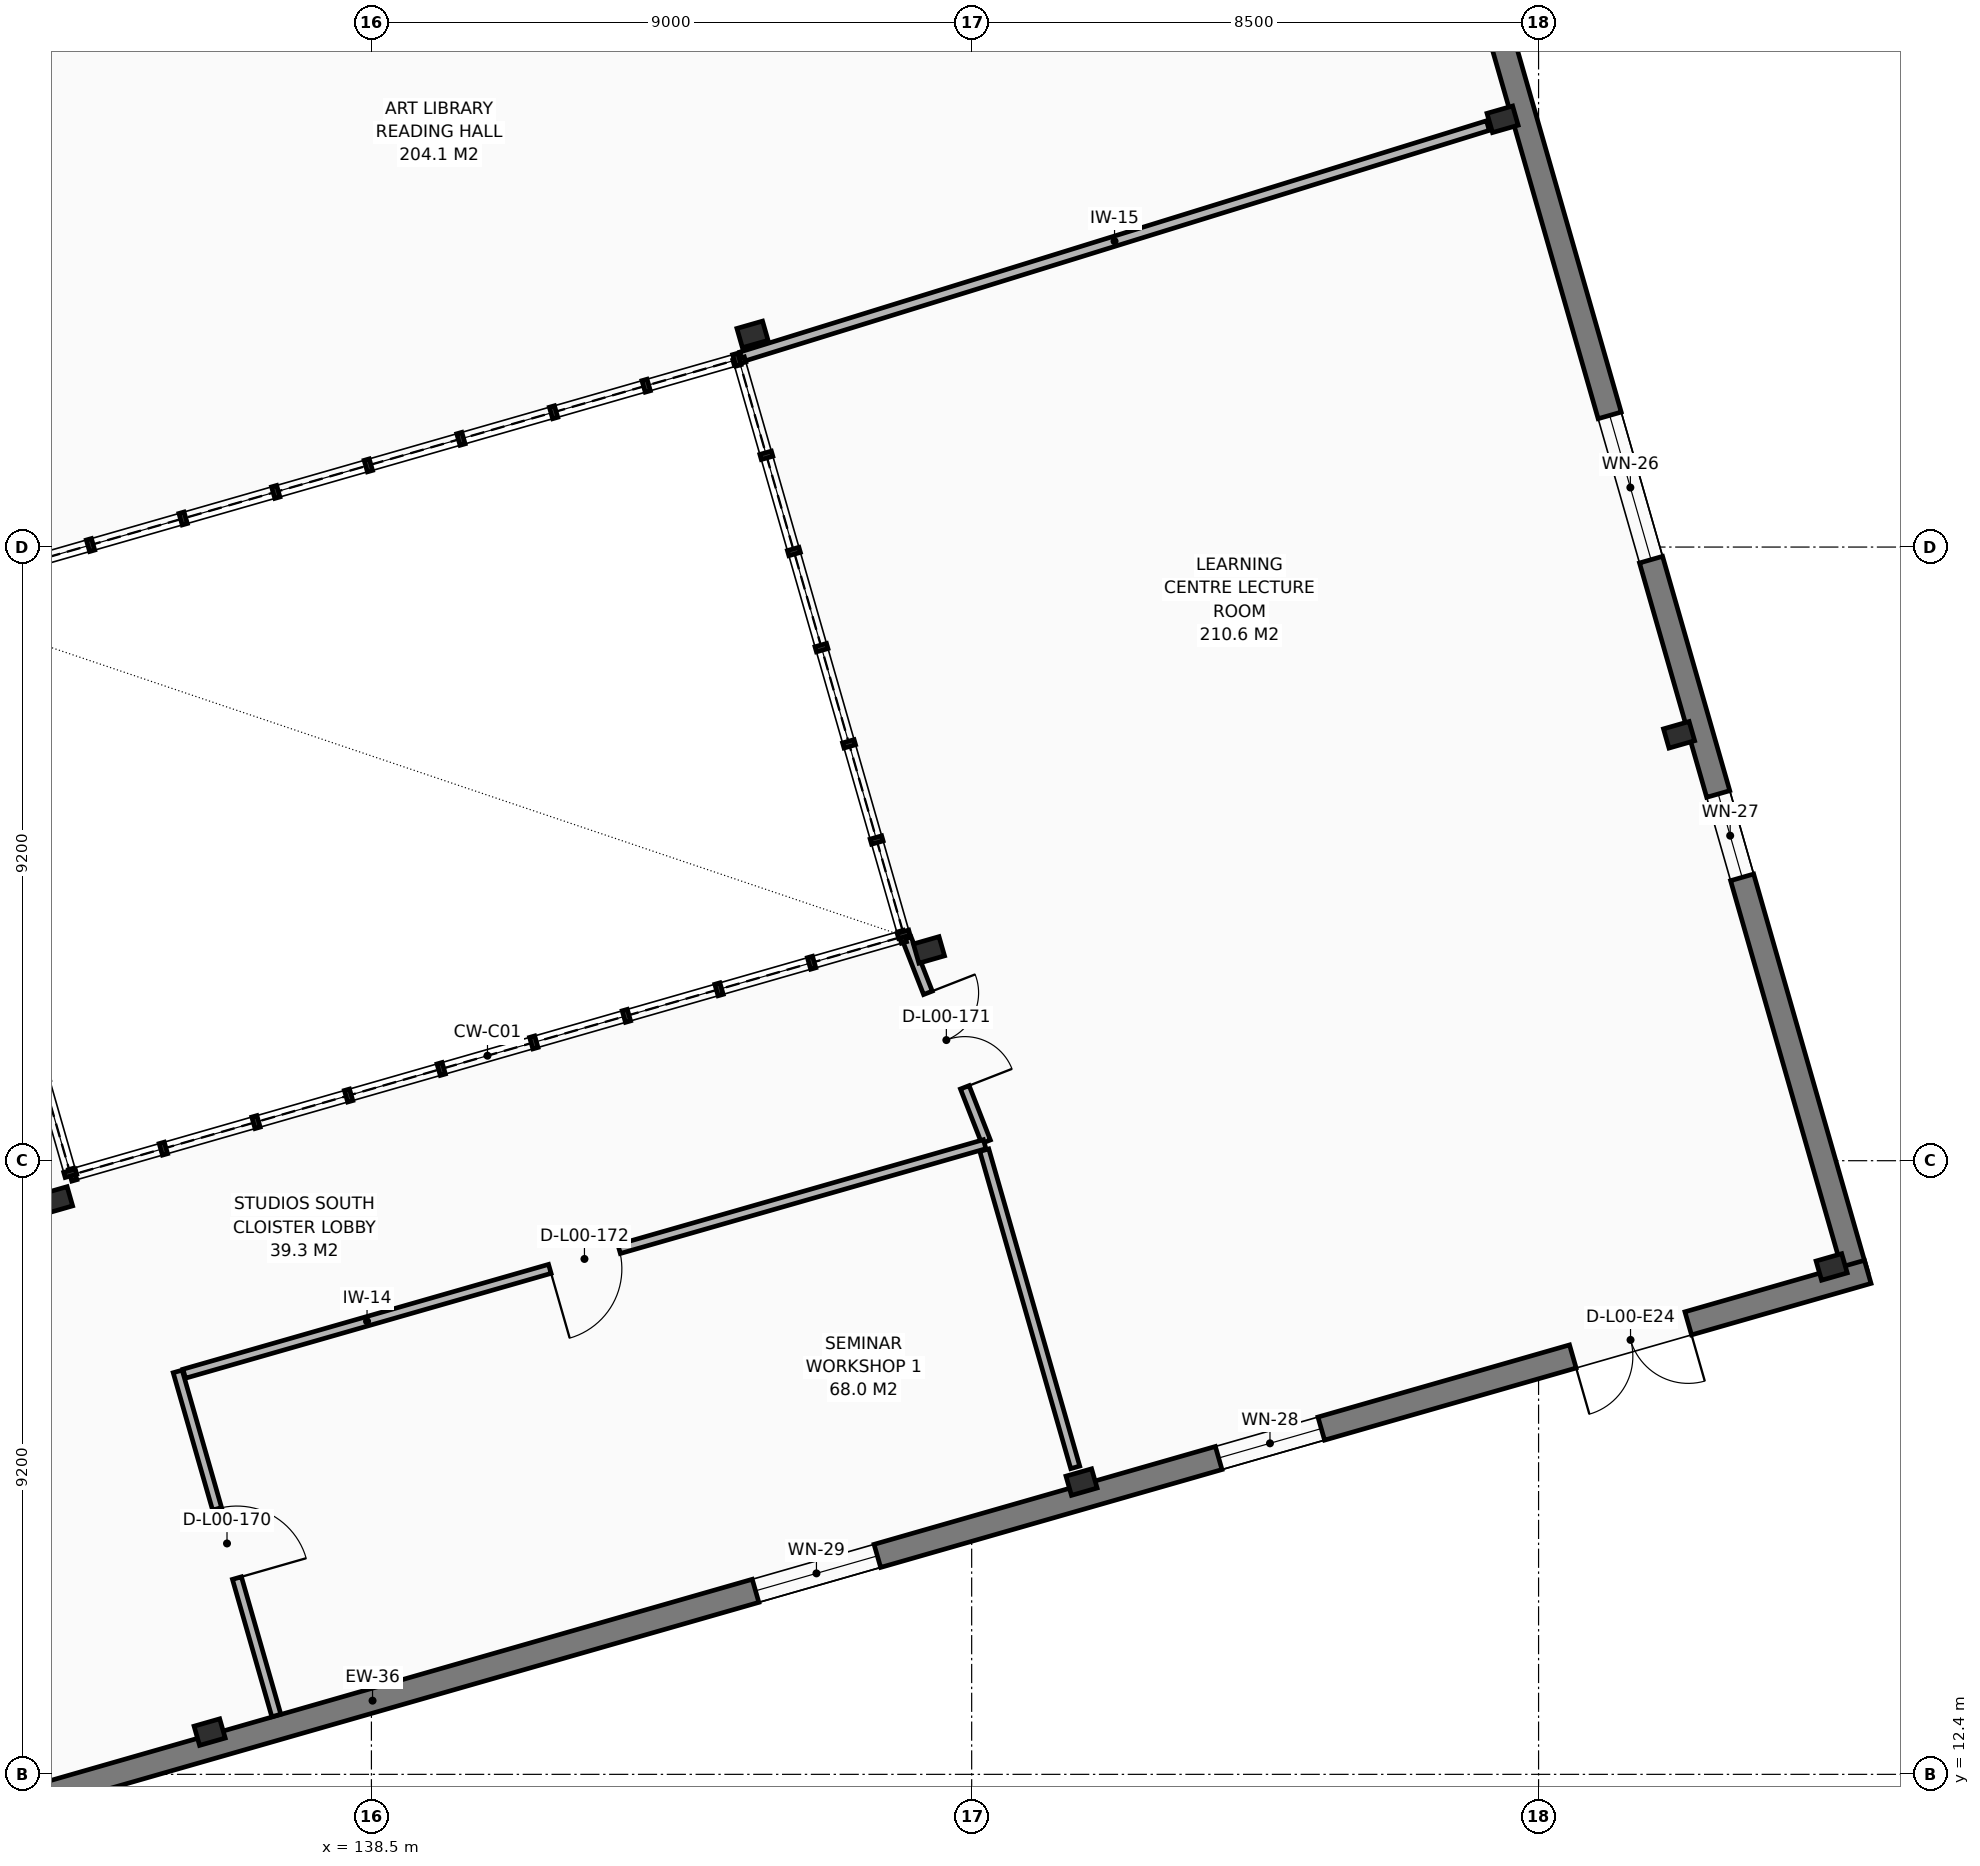
"""IFC4 building model, lengths in metres.
Left out: names, types, materials, properties, quantities, classifications, styles, units other than length and angle.
Written with IfcOpenShell. Run it as: python <this file> out.ifc"""

import sys

from ifc_helpers import new_model, si_unit, direction, frame, frame_2d, origin, origin_2d, place, context, subcontext, project, spatial, rectangle, i_section, extrude, element, fill, save


model = new_model("IFC4")
c1 = context("Model", 3, precision=1e-05, world=origin(), true_north=direction((0.0, 1.0)))
c2 = subcontext(c1, "Body", "Model", "MODEL_VIEW")
j1 = project(units=[si_unit("LENGTHUNIT", "METRE"), si_unit("PLANEANGLEUNIT", "RADIAN")], contexts=[c1])
p1 = place(None, origin())
s1 = spatial("IfcSite", under=j1, at=p1, CompositionType="ELEMENT")
p2 = place(p1, origin())
s2 = spatial("IfcBuilding", under=s1, at=p2, CompositionType="ELEMENT")
p3 = place(p2, origin())
s3 = spatial("IfcBuildingStorey", under=s2, at=p3, CompositionType="ELEMENT", Elevation=0.0)
for number, where, z_axis, x_axis in (
    (1, (136.074, 13.033, 0.0), (0.0, 0.0, 1.0), (0.961, 0.276, 0.0)),
    (2, (133.787, 21.012, 0.0), (0.0, 0.0, 1.0), (0.961, 0.276, 0.0)),
    (3, (149.147, 16.782, 0.0), (0.0, 0.0, 1.0), (0.961, 0.276, 0.0)),
    (4, (146.86, 24.76, 0.0), (0.0, 0.0, 1.0), (0.961, 0.276, 0.0)),
    (5, (144.213, 33.988, 0.0), (0.0, 0.0, 1.0), (0.961, 0.276, 0.0)),
    (6, (160.394, 20.007, 0.0), (0.0, 0.0, 1.0), (0.961, 0.276, 0.0)),
    (7, (158.106, 27.985, 0.0), (0.0, 0.0, 1.0), (0.961, 0.276, 0.0)),
    (8, (155.46, 37.213, 0.0), (0.0, 0.0, 1.0), (0.961, 0.276, 0.0)),
):
    element("IfcColumn", number, at=place(p3, frame(where, z_axis=z_axis, x_axis=x_axis)), inside=s3, PredefinedType="COLUMN", context=c2, shape_type="SweptSolid", body=[
        extrude(i_section(OverallWidth=0.3, OverallDepth=0.4, WebThickness=0.013, FlangeThickness=0.024, FilletRadius=0.027, at=origin_2d()), origin(), (0.0, 0.0, 1.0), 5.1),
    ])
p4 = place(p3, frame((120.598, 36.08, 0.0), z_axis=(0.0, 0.0, 1.0), x_axis=(0.961262598049, 0.275634209764, 0.0)))
e9 = element("IfcWall", 9, at=p4, inside=s3, PredefinedType="SOLIDWALL", context=c2, shape_type="SweptSolid", body=[
    extrude(rectangle(XDim=34.145, YDim=0.36, at=frame_2d((17.072, 0.0))), origin(), (0.0, 0.0, 1.0), 4.88),
])
p5 = place(p4, frame((1.6, 0.0, 0.85)))
e10 = element("IfcOpeningElement", 10, at=p5, cuts=e9, PredefinedType="OPENING", context=c2, shape_type="SweptSolid", body=[
    extrude(rectangle(XDim=1.2, YDim=1.4, at=frame_2d((0.6, 0.7))), frame((0.0, 0.19, 0.0), z_axis=(0.0, -1.0, 0.0), x_axis=(1.0, 0.0, 0.0)), (0.0, 0.0, 1.0), 0.38),
])
p6 = place(p4, frame((13.978, 0.0, 0.85)))
e11 = element("IfcOpeningElement", 11, at=p6, cuts=e9, PredefinedType="OPENING", context=c2, shape_type="SweptSolid", body=[
    extrude(rectangle(XDim=1.65, YDim=1.4, at=frame_2d((0.825, 0.7))), frame((0.0, 0.19, 0.0), z_axis=(0.0, -1.0, 0.0), x_axis=(1.0, 0.0, 0.0)), (0.0, 0.0, 1.0), 0.38),
])
p7 = place(p4, frame((26.356, 0.0, 0.85)))
e12 = element("IfcOpeningElement", 12, at=p7, cuts=e9, PredefinedType="OPENING", context=c2, shape_type="SweptSolid", body=[
    extrude(rectangle(XDim=2.05, YDim=1.4, at=frame_2d((1.025, 0.7))), frame((0.0, 0.19, 0.0), z_axis=(0.0, -1.0, 0.0), x_axis=(1.0, 0.0, 0.0)), (0.0, 0.0, 1.0), 0.38),
])
p8 = place(p3, frame((153.37, 45.665, 0.0), z_axis=(0.0, 0.0, 1.0), x_axis=(0.2756371372, -0.961261758626, 0.0)))
e13 = element("IfcWall", 13, at=p8, inside=s3, PredefinedType="SOLIDWALL", context=c2, shape_type="SweptSolid", body=[
    extrude(rectangle(XDim=26.82, YDim=0.36, at=frame_2d((13.41, 0.0))), origin(), (0.0, 0.0, 1.0), 4.88),
])
p9 = place(p8, frame((1.6, 0.0, 0.85)))
e14 = element("IfcOpeningElement", 14, at=p9, cuts=e13, PredefinedType="OPENING", context=c2, shape_type="SweptSolid", body=[
    extrude(rectangle(XDim=1.85, YDim=1.4, at=frame_2d((0.925, 0.7))), frame((0.0, 0.19, 0.0), z_axis=(0.0, -1.0, 0.0), x_axis=(1.0, 0.0, 0.0)), (0.0, 0.0, 1.0), 0.38),
])
p10 = place(p8, frame((13.41, 0.0, 0.85)))
e15 = element("IfcOpeningElement", 15, at=p10, cuts=e13, PredefinedType="OPENING", context=c2, shape_type="SweptSolid", body=[
    extrude(rectangle(XDim=2.25, YDim=1.4, at=frame_2d((1.125, 0.7))), frame((0.0, 0.19, 0.0), z_axis=(0.0, -1.0, 0.0), x_axis=(1.0, 0.0, 0.0)), (0.0, 0.0, 1.0), 0.38),
])
p11 = place(p8, frame((19.315, 0.0, 0.85)))
e16 = element("IfcOpeningElement", 16, at=p11, cuts=e13, PredefinedType="OPENING", context=c2, shape_type="SweptSolid", body=[
    extrude(rectangle(XDim=1.3, YDim=1.6, at=frame_2d((0.65, 0.8))), frame((0.0, 0.19, 0.0), z_axis=(0.0, -1.0, 0.0), x_axis=(1.0, 0.0, 0.0)), (0.0, 0.0, 1.0), 0.38),
])
p12 = place(p3, frame((160.936, 19.933, 0.0), z_axis=(0.0, 0.0, 1.0), x_axis=(-0.961262132762, -0.275635832428, 0.0)))
e17 = element("IfcWall", 17, at=p12, inside=s3, PredefinedType="SOLIDWALL", context=c2, shape_type="SweptSolid", body=[
    extrude(rectangle(XDim=37.82, YDim=0.36, at=frame_2d((18.91, 0.0))), origin(), (0.0, 0.0, 1.0), 4.88),
])
p13 = place(p12, frame((2.8, 0.0, 0.0)))
e18 = element("IfcOpeningElement", 18, at=p13, cuts=e17, PredefinedType="OPENING", context=c2, shape_type="SweptSolid", body=[
    extrude(rectangle(XDim=1.8, YDim=2.25, at=frame_2d((0.9, 1.125))), frame((0.0, 0.19, 0.0), z_axis=(0.0, -1.0, 0.0), x_axis=(1.0, 0.0, 0.0)), (0.0, 0.0, 1.0), 0.38),
])
p14 = place(p12, frame((8.524, 0.0, 0.85)))
e19 = element("IfcOpeningElement", 19, at=p14, cuts=e17, PredefinedType="OPENING", context=c2, shape_type="SweptSolid", body=[
    extrude(rectangle(XDim=1.6, YDim=1.6, at=frame_2d((0.8, 0.8))), frame((0.0, 0.19, 0.0), z_axis=(0.0, -1.0, 0.0), x_axis=(1.0, 0.0, 0.0)), (0.0, 0.0, 1.0), 0.38),
])
p15 = place(p12, frame((15.448, 0.0, 0.85)))
e20 = element("IfcOpeningElement", 20, at=p15, cuts=e17, PredefinedType="OPENING", context=c2, shape_type="SweptSolid", body=[
    extrude(rectangle(XDim=1.9, YDim=1.6, at=frame_2d((0.95, 0.8))), frame((0.0, 0.19, 0.0), z_axis=(0.0, -1.0, 0.0), x_axis=(1.0, 0.0, 0.0)), (0.0, 0.0, 1.0), 0.38),
])
p16 = place(p12, frame((29.296, 0.0, 0.85)))
e21 = element("IfcOpeningElement", 21, at=p16, cuts=e17, PredefinedType="OPENING", context=c2, shape_type="SweptSolid", body=[
    extrude(rectangle(XDim=1.35, YDim=1.5, at=frame_2d((0.675, 0.75))), frame((0.0, 0.19, 0.0), z_axis=(0.0, -1.0, 0.0), x_axis=(1.0, 0.0, 0.0)), (0.0, 0.0, 1.0), 0.38),
])
p17 = place(p3, frame((135.595, 18.441, 0.0), z_axis=(0.0, 0.0, 1.0), x_axis=(0.275622367891, -0.96126599353, 0.0)))
e22 = element("IfcWall", 22, at=p17, inside=s3, PredefinedType="PARTITIONING", context=c2, shape_type="SweptSolid", body=[
    extrude(rectangle(XDim=5.366, YDim=0.14, at=frame_2d((2.683, 0.0))), origin(), (0.0, 0.0, 1.0), 4.37),
])
p18 = place(p17, frame((2.143, 0.0, 0.0)))
e23 = element("IfcOpeningElement", 23, at=p18, cuts=e22, PredefinedType="OPENING", context=c2, shape_type="SweptSolid", body=[
    extrude(rectangle(XDim=1.08, YDim=2.12, at=frame_2d((0.54, 1.06))), frame((0.0, 0.08, 0.0), z_axis=(0.0, -1.0, 0.0), x_axis=(1.0, 0.0, 0.0)), (0.0, 0.0, 1.0), 0.16),
])
p19 = place(p3, frame((146.525, 24.932, 0.0), z_axis=(0.0, 0.0, 1.0), x_axis=(0.363735192139, -0.931502393985, 0.0)))
e24 = element("IfcWall", 24, at=p19, inside=s3, PredefinedType="PARTITIONING", context=c2, shape_type="SweptSolid", body=[
    extrude(rectangle(XDim=3.271, YDim=0.14, at=frame_2d((1.636, 0.0))), origin(), (0.0, 0.0, 1.0), 4.37),
])
p20 = place(p19, frame((0.876, 0.0, 0.0)))
e25 = element("IfcOpeningElement", 25, at=p20, cuts=e24, PredefinedType="OPENING", context=c2, shape_type="SweptSolid", body=[
    extrude(rectangle(XDim=1.52, YDim=2.2, at=frame_2d((0.76, 1.1))), frame((0.0, 0.08, 0.0), z_axis=(0.0, -1.0, 0.0), x_axis=(1.0, 0.0, 0.0)), (0.0, 0.0, 1.0), 0.16),
])
p21 = place(p3, frame((147.695, 21.848, 0.0), z_axis=(0.0, 0.0, 1.0), x_axis=(-0.961259327695, -0.275645614728, 0.0)))
e26 = element("IfcWall", 26, at=p21, inside=s3, PredefinedType="PARTITIONING", context=c2, shape_type="SweptSolid", body=[
    extrude(rectangle(XDim=12.485, YDim=0.14, at=frame_2d((6.242, 0.0))), origin(), (0.0, 0.0, 1.0), 4.42),
])
p22 = place(p21, frame((5.702, 0.0, 0.0)))
e27 = element("IfcOpeningElement", 27, at=p22, cuts=e26, PredefinedType="OPENING", context=c2, shape_type="SweptSolid", body=[
    extrude(rectangle(XDim=1.08, YDim=2.12, at=frame_2d((0.54, 1.06))), frame((0.0, 0.08, 0.0), z_axis=(0.0, -1.0, 0.0), x_axis=(1.0, 0.0, 0.0)), (0.0, 0.0, 1.0), 0.16),
])
p23 = place(p3, frame((155.24, 37.119, 0.0), z_axis=(0.0, 0.0, 1.0), x_axis=(-0.955222404678, -0.295888758828, 0.0)))
e28 = element("IfcWall", 28, at=p23, inside=s3, PredefinedType="PARTITIONING", context=c2, shape_type="SweptSolid", body=[
    extrude(rectangle(XDim=11.72, YDim=0.15, at=frame_2d((5.86, 0.0))), origin(), (0.0, 0.0, 1.0), 4.37),
])
p24 = place(p3, frame((149.053, 17.002, 0.0), z_axis=(0.0, 0.0, 1.0), x_axis=(-0.275613946292, 0.961268408203, 0.0)))
e29 = element("IfcWall", 29, at=p24, inside=s3, PredefinedType="PARTITIONING", context=c2, shape_type="SweptSolid", body=[
    extrude(rectangle(XDim=4.947, YDim=0.14, at=frame_2d((2.474, 0.0))), origin(), (0.0, 0.0, 1.0), 4.37),
])
p25 = place(p10, origin())
e30 = element("IfcWindow", 30, at=p25, inside=s3, PartitioningType="SINGLE_PANEL", PredefinedType="WINDOW", context=c2, shape_type="SweptSolid", body=[
    extrude(rectangle(XDim=2.25, YDim=1.4, at=frame_2d((1.125, 0.7))), frame((0.0, 0.03, 0.0), z_axis=(0.0, -1.0, 0.0), x_axis=(1.0, 0.0, 0.0)), (0.0, 0.0, 1.0), 0.06),
])
fill(e15, e30)
p26 = place(p11, origin())
e31 = element("IfcWindow", 31, at=p26, inside=s3, PartitioningType="SINGLE_PANEL", PredefinedType="WINDOW", context=c2, shape_type="SweptSolid", body=[
    extrude(rectangle(XDim=1.3, YDim=1.6, at=frame_2d((0.65, 0.8))), frame((0.0, 0.03, 0.0), z_axis=(0.0, -1.0, 0.0), x_axis=(1.0, 0.0, 0.0)), (0.0, 0.0, 1.0), 0.06),
])
fill(e16, e31)
p27 = place(p13, origin())
e32 = element("IfcDoor", 32, at=p27, inside=s3, OperationType="DOUBLE_DOOR_SINGLE_SWING", PredefinedType="DOOR", context=c2, shape_type="SweptSolid", body=[
    extrude(rectangle(XDim=1.8, YDim=2.25, at=frame_2d((0.9, 1.125))), frame((0.0, 0.025, 0.0), z_axis=(0.0, -1.0, 0.0), x_axis=(1.0, 0.0, 0.0)), (0.0, 0.0, 1.0), 0.05),
])
fill(e18, e32)
p28 = place(p14, origin())
e33 = element("IfcWindow", 33, at=p28, inside=s3, PartitioningType="SINGLE_PANEL", PredefinedType="WINDOW", context=c2, shape_type="SweptSolid", body=[
    extrude(rectangle(XDim=1.6, YDim=1.6, at=frame_2d((0.8, 0.8))), frame((0.0, 0.03, 0.0), z_axis=(0.0, -1.0, 0.0), x_axis=(1.0, 0.0, 0.0)), (0.0, 0.0, 1.0), 0.06),
])
fill(e19, e33)
p29 = place(p15, origin())
e34 = element("IfcWindow", 34, at=p29, inside=s3, PartitioningType="SINGLE_PANEL", PredefinedType="WINDOW", context=c2, shape_type="SweptSolid", body=[
    extrude(rectangle(XDim=1.9, YDim=1.6, at=frame_2d((0.95, 0.8))), frame((0.0, 0.03, 0.0), z_axis=(0.0, -1.0, 0.0), x_axis=(1.0, 0.0, 0.0)), (0.0, 0.0, 1.0), 0.06),
])
fill(e20, e34)
p30 = place(p18, origin())
e35 = element("IfcDoor", 35, at=p30, inside=s3, OperationType="SINGLE_SWING_RIGHT", PredefinedType="DOOR", context=c2, shape_type="SweptSolid", body=[
    extrude(rectangle(XDim=1.08, YDim=2.12, at=frame_2d((0.54, 1.06))), frame((0.0, 0.025, 0.0), z_axis=(0.0, -1.0, 0.0), x_axis=(1.0, 0.0, 0.0)), (0.0, 0.0, 1.0), 0.05),
])
fill(e23, e35)
p31 = place(p20, origin())
e36 = element("IfcDoor", 36, at=p31, inside=s3, OperationType="DOUBLE_DOOR_SINGLE_SWING", PredefinedType="DOOR", context=c2, shape_type="SweptSolid", body=[
    extrude(rectangle(XDim=1.52, YDim=2.2, at=frame_2d((0.76, 1.1))), frame((0.0, 0.025, 0.0), z_axis=(0.0, -1.0, 0.0), x_axis=(1.0, 0.0, 0.0)), (0.0, 0.0, 1.0), 0.05),
])
fill(e25, e36)
p32 = place(p22, origin())
e37 = element("IfcDoor", 37, at=p32, inside=s3, OperationType="SINGLE_SWING_RIGHT", PredefinedType="DOOR", context=c2, shape_type="SweptSolid", body=[
    extrude(rectangle(XDim=1.08, YDim=2.12, at=frame_2d((0.54, 1.06))), frame((0.0, 0.025, 0.0), z_axis=(0.0, -1.0, 0.0), x_axis=(1.0, 0.0, 0.0)), (0.0, 0.0, 1.0), 0.05),
])
fill(e27, e37)
save(model, sys.argv[1])
